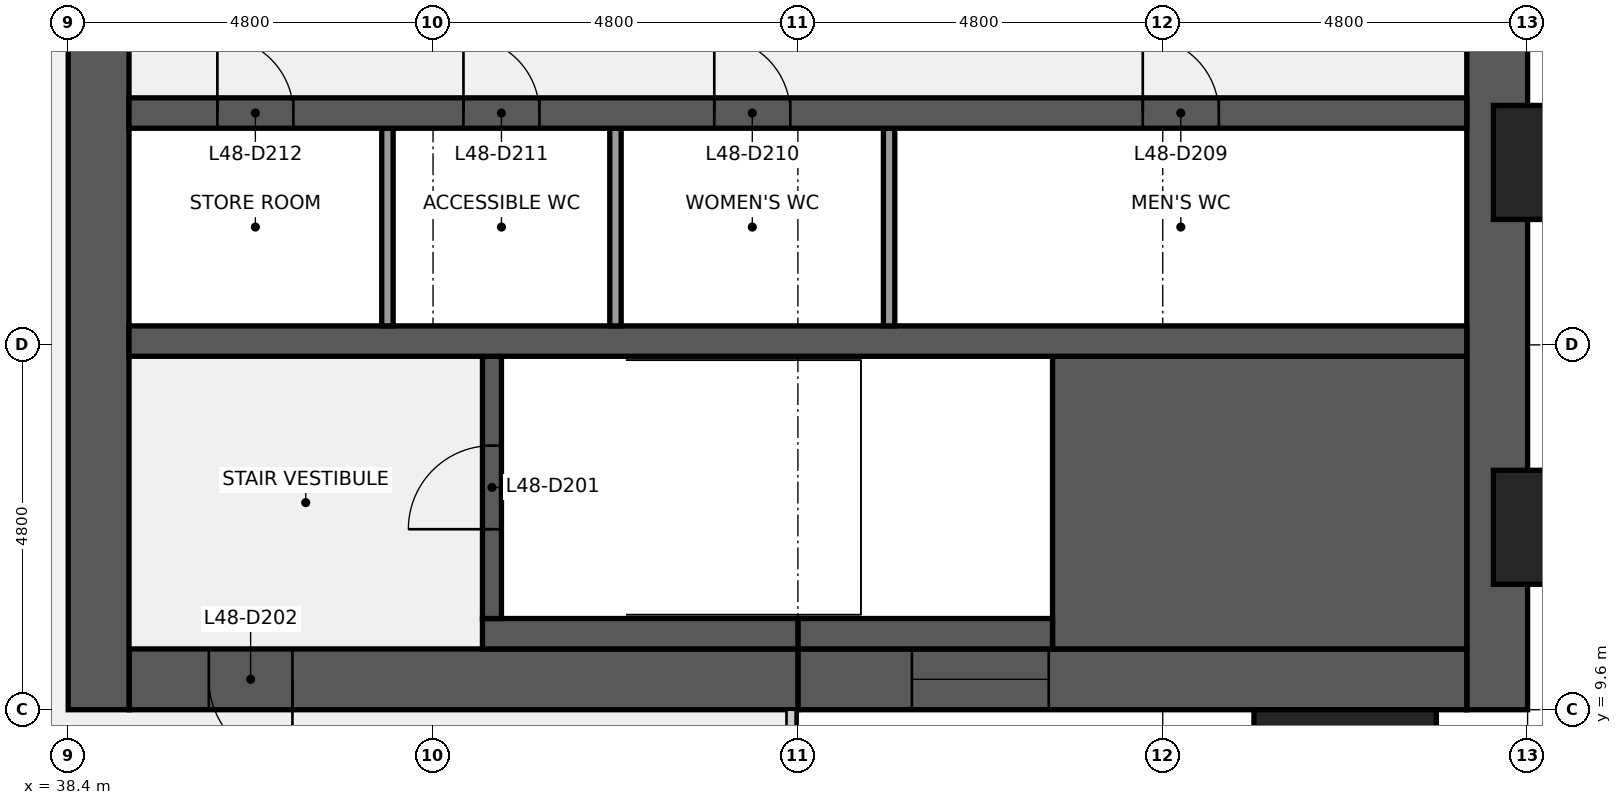
"""IFC4 building model, lengths in metres.
Left out: names, types, materials, properties, quantities, classifications, styles, units other than length and angle.
Written with IfcOpenShell. Run it as: python <this file> out.ifc"""

import sys

from ifc_helpers import new_model, si_unit, direction, frame, frame_2d, origin, origin_2d, place, context, subcontext, project, spatial, rectangle, extrude, element, fill, save


model = new_model("IFC4")
c1 = context("Model", 3, precision=1e-05, world=origin(), true_north=direction((0.0, 1.0)))
c2 = subcontext(c1, "Body", "Model", "MODEL_VIEW")
j1 = project(units=[si_unit("LENGTHUNIT", "METRE"), si_unit("PLANEANGLEUNIT", "RADIAN")], contexts=[c1])
p1 = place(None, origin())
s1 = spatial("IfcSite", under=j1, at=p1, CompositionType="ELEMENT")
p2 = place(p1, origin())
s2 = spatial("IfcBuilding", under=s1, at=p2, CompositionType="ELEMENT")
p3 = place(p2, frame((0.0, 0.0, 221.2)))
s3 = spatial("IfcBuildingStorey", under=s2, at=p3, CompositionType="ELEMENT", Elevation=221.2)
p4 = place(p3, frame((57.2, 38.4, 0.0), z_axis=(0.0, 0.0, 1.0), x_axis=(0.0, -1.0, 0.0)))
e1 = element("IfcWall", 1, at=p4, inside=s3, PredefinedType="SHEAR", context=c2, shape_type="SweptSolid", body=[
    extrude(rectangle(XDim=28.8, YDim=0.8, at=frame_2d((14.4, 0.0))), origin(), (0.0, 0.0, 1.0), 3.84),
])
p5 = place(p4, frame((18.45, 0.0, 0.9)))
e2 = element("IfcOpeningElement", 2, at=p5, cuts=e1, PredefinedType="OPENING", context=c2, shape_type="SweptSolid", body=[
    extrude(rectangle(XDim=1.5, YDim=1.5, at=frame_2d((0.75, 0.75))), frame((0.0, 0.41, 0.0), z_axis=(0.0, -1.0, 0.0), x_axis=(1.0, 0.0, 0.0)), (0.0, 0.0, 1.0), 0.82),
])
p6 = place(p4, frame((8.85, 0.0, 0.9)))
e3 = element("IfcOpeningElement", 3, at=p6, cuts=e1, PredefinedType="OPENING", context=c2, shape_type="SweptSolid", body=[
    extrude(rectangle(XDim=1.5, YDim=1.5, at=frame_2d((0.75, 0.75))), frame((0.0, 0.41, 0.0), z_axis=(0.0, -1.0, 0.0), x_axis=(1.0, 0.0, 0.0)), (0.0, 0.0, 1.0), 0.82),
])
p7 = place(p3, frame((56.8, 10.0, 0.0), z_axis=(0.0, 0.0, 1.0), x_axis=(-1.0, 0.0, 0.0)))
e4 = element("IfcWall", 4, at=p7, inside=s3, PredefinedType="SHEAR", context=c2, shape_type="SweptSolid", body=[
    extrude(rectangle(XDim=8.8, YDim=0.8, at=frame_2d((4.4, 0.0))), origin(), (0.0, 0.0, 1.0), 3.84),
])
p8 = place(p7, frame((5.5, 0.0, 0.9)))
e5 = element("IfcOpeningElement", 5, at=p8, cuts=e4, PredefinedType="OPENING", context=c2, shape_type="SweptSolid", body=[
    extrude(rectangle(XDim=1.8, YDim=1.5, at=frame_2d((0.9, 0.75))), frame((0.0, 0.41, 0.0), z_axis=(0.0, -1.0, 0.0), x_axis=(1.0, 0.0, 0.0)), (0.0, 0.0, 1.0), 0.82),
])
p9 = place(p3, frame((48.0, 10.0, 0.0), z_axis=(0.0, 0.0, 1.0), x_axis=(-1.0, 0.0, 0.0)))
e6 = element("IfcWall", 6, at=p9, inside=s3, PredefinedType="SHEAR", context=c2, shape_type="SweptSolid", body=[
    extrude(rectangle(XDim=8.8, YDim=0.8, at=frame_2d((4.4, 0.0))), origin(), (0.0, 0.0, 1.0), 3.84),
])
p10 = place(p9, frame((6.65, 0.0, 0.0)))
e7 = element("IfcOpeningElement", 7, at=p10, cuts=e6, PredefinedType="OPENING", context=c2, shape_type="SweptSolid", body=[
    extrude(rectangle(XDim=1.1, YDim=2.1, at=frame_2d((0.55, 1.05))), frame((0.0, 0.41, 0.0), z_axis=(0.0, -1.0, 0.0), x_axis=(1.0, 0.0, 0.0)), (0.0, 0.0, 1.0), 0.82),
])
p11 = place(p3, frame((38.8, 9.6, 0.0), z_axis=(0.0, 0.0, 1.0), x_axis=(0.0, 1.0, 0.0)))
e8 = element("IfcWall", 8, at=p11, inside=s3, PredefinedType="SHEAR", context=c2, shape_type="SweptSolid", body=[
    extrude(rectangle(XDim=28.8, YDim=0.8, at=frame_2d((14.4, 0.0))), origin(), (0.0, 0.0, 1.0), 3.84),
])
p12 = place(p11, frame((8.7, 0.0, 0.0)))
e9 = element("IfcOpeningElement", 9, at=p12, cuts=e8, PredefinedType="OPENING", context=c2, shape_type="SweptSolid", body=[
    extrude(rectangle(XDim=1.8, YDim=2.1, at=frame_2d((0.9, 1.05))), frame((0.0, 0.41, 0.0), z_axis=(0.0, -1.0, 0.0), x_axis=(1.0, 0.0, 0.0)), (0.0, 0.0, 1.0), 0.82),
])
p13 = place(p11, frame((18.3, 0.0, 0.0)))
e10 = element("IfcOpeningElement", 10, at=p13, cuts=e8, PredefinedType="OPENING", context=c2, shape_type="SweptSolid", body=[
    extrude(rectangle(XDim=1.8, YDim=2.1, at=frame_2d((0.9, 1.05))), frame((0.0, 0.41, 0.0), z_axis=(0.0, -1.0, 0.0), x_axis=(1.0, 0.0, 0.0)), (0.0, 0.0, 1.0), 0.82),
])
p14 = place(p3, frame((51.35, 12.325, 0.0), z_axis=(0.0, 0.0, 1.0), x_axis=(1.0, 0.0, 0.0)))
e11 = element("IfcWall", 11, at=p14, inside=s3, PredefinedType="SHEAR", context=c2, shape_type="SweptSolid", body=[
    extrude(rectangle(XDim=5.45, YDim=3.85, at=frame_2d((2.725, 0.0))), origin(), (0.0, 0.0, 1.0), 3.84),
])
p15 = place(p3, frame((48.0, 10.6, 0.0), z_axis=(0.0, 0.0, 1.0), x_axis=(1.0, 0.0, 0.0)))
e12 = element("IfcWall", 12, at=p15, inside=s3, PredefinedType="SHEAR", context=c2, shape_type="SweptSolid", body=[
    extrude(rectangle(XDim=3.35, YDim=0.4, at=frame_2d((1.675, 0.0))), origin(), (0.0, 0.0, 1.0), 3.84),
])
p16 = place(p3, frame((43.85, 10.6, 0.0), z_axis=(0.0, 0.0, 1.0), x_axis=(1.0, 0.0, 0.0)))
e13 = element("IfcWall", 13, at=p16, inside=s3, PredefinedType="SHEAR", context=c2, shape_type="SweptSolid", body=[
    extrude(rectangle(XDim=4.15, YDim=0.4, at=frame_2d((2.075, 0.0))), origin(), (0.0, 0.0, 1.0), 3.84),
])
p17 = place(p3, frame((43.975, 10.8, 0.0), z_axis=(0.0, 0.0, 1.0), x_axis=(0.0, 1.0, 0.0)))
e14 = element("IfcWall", 14, at=p17, inside=s3, PredefinedType="SHEAR", context=c2, shape_type="SweptSolid", body=[
    extrude(rectangle(XDim=3.45, YDim=0.25, at=frame_2d((1.725, 0.0))), origin(), (0.0, 0.0, 1.0), 3.84),
])
p18 = place(p17, frame((1.175, 0.0, 0.0)))
e15 = element("IfcOpeningElement", 15, at=p18, cuts=e14, PredefinedType="OPENING", context=c2, shape_type="SweptSolid", body=[
    extrude(rectangle(XDim=1.1, YDim=2.1, at=frame_2d((0.55, 1.05))), frame((0.0, 0.135, 0.0), z_axis=(0.0, -1.0, 0.0), x_axis=(1.0, 0.0, 0.0)), (0.0, 0.0, 1.0), 0.27),
])
p19 = place(p3, frame((39.2, 14.45, 0.0), z_axis=(0.0, 0.0, 1.0), x_axis=(1.0, 0.0, 0.0)))
e16 = element("IfcWall", 16, at=p19, inside=s3, PredefinedType="SHEAR", context=c2, shape_type="SweptSolid", body=[
    extrude(rectangle(XDim=17.6, YDim=0.4, at=frame_2d((8.8, 0.0))), origin(), (0.0, 0.0, 1.0), 3.84),
])
for number, where, z_axis, x_axis in (
    (17, (49.2, 14.65, 0.0), (0.0, 0.0, 1.0), (0.0, 1.0, 0.0)),
    (18, (45.6, 14.65, 0.0), (0.0, 0.0, 1.0), (0.0, 1.0, 0.0)),
    (19, (42.6, 14.65, 0.0), (0.0, 0.0, 1.0), (0.0, 1.0, 0.0)),
):
    element("IfcWall", number, at=place(p3, frame(where, z_axis=z_axis, x_axis=x_axis)), inside=s3, PredefinedType="PARTITIONING", context=c2, shape_type="SweptSolid", body=[
        extrude(rectangle(XDim=2.6, YDim=0.15, at=frame_2d((1.3, 0.0))), origin(), (0.0, 0.0, 1.0), 3.84),
    ])
p20 = place(p3, frame((39.2, 17.45, 0.0), z_axis=(0.0, 0.0, 1.0), x_axis=(1.0, 0.0, 0.0)))
e20 = element("IfcWall", 20, at=p20, inside=s3, PredefinedType="SHEAR", context=c2, shape_type="SweptSolid", body=[
    extrude(rectangle(XDim=17.6, YDim=0.4, at=frame_2d((8.8, 0.0))), origin(), (0.0, 0.0, 1.0), 3.84),
])
p21 = place(p20, frame((13.337, 0.0, 0.0)))
e21 = element("IfcOpeningElement", 21, at=p21, cuts=e20, PredefinedType="OPENING", context=c2, shape_type="SweptSolid", body=[
    extrude(rectangle(XDim=1.0, YDim=2.1, at=frame_2d((0.5, 1.05))), frame((0.0, 0.21, 0.0), z_axis=(0.0, -1.0, 0.0), x_axis=(1.0, 0.0, 0.0)), (0.0, 0.0, 1.0), 0.42),
])
p22 = place(p20, frame((7.7, 0.0, 0.0)))
e22 = element("IfcOpeningElement", 22, at=p22, cuts=e20, PredefinedType="OPENING", context=c2, shape_type="SweptSolid", body=[
    extrude(rectangle(XDim=1.0, YDim=2.1, at=frame_2d((0.5, 1.05))), frame((0.0, 0.21, 0.0), z_axis=(0.0, -1.0, 0.0), x_axis=(1.0, 0.0, 0.0)), (0.0, 0.0, 1.0), 0.42),
])
p23 = place(p20, frame((4.4, 0.0, 0.0)))
e23 = element("IfcOpeningElement", 23, at=p23, cuts=e20, PredefinedType="OPENING", context=c2, shape_type="SweptSolid", body=[
    extrude(rectangle(XDim=1.0, YDim=2.1, at=frame_2d((0.5, 1.05))), frame((0.0, 0.21, 0.0), z_axis=(0.0, -1.0, 0.0), x_axis=(1.0, 0.0, 0.0)), (0.0, 0.0, 1.0), 0.42),
])
p24 = place(p20, frame((1.163, 0.0, 0.0)))
e24 = element("IfcOpeningElement", 24, at=p24, cuts=e20, PredefinedType="OPENING", context=c2, shape_type="SweptSolid", body=[
    extrude(rectangle(XDim=1.0, YDim=2.1, at=frame_2d((0.5, 1.05))), frame((0.0, 0.21, 0.0), z_axis=(0.0, -1.0, 0.0), x_axis=(1.0, 0.0, 0.0)), (0.0, 0.0, 1.0), 0.42),
])
for number, where, z_axis, x_axis in (
    (25, (55.2, 8.85, 0.0), (0.0, 0.0, 1.0), (1.0, 0.0, 0.0)),
    (26, (58.35, 12.0, 0.0), (0.0, 0.0, 1.0), (0.0, 1.0, 0.0)),
    (27, (58.35, 16.8, 0.0), (0.0, 0.0, 1.0), (0.0, 1.0, 0.0)),
):
    element("IfcColumn", number, at=place(p3, frame(where, z_axis=z_axis, x_axis=x_axis)), inside=s3, PredefinedType="PILASTER", context=c2, shape_type="SweptSolid", body=[
        extrude(rectangle(XDim=2.4, YDim=1.5, at=origin_2d()), origin(), (0.0, 0.0, 1.0), 4.0),
    ])
p25 = place(p18, origin())
e28 = element("IfcDoor", 28, at=p25, inside=s3, OperationType="SINGLE_SWING_LEFT", PredefinedType="DOOR", context=c2, shape_type="SweptSolid", body=[
    extrude(rectangle(XDim=1.1, YDim=2.1, at=frame_2d((0.55, 1.05))), frame((0.0, 0.025, 0.0), z_axis=(0.0, -1.0, 0.0), x_axis=(1.0, 0.0, 0.0)), (0.0, 0.0, 1.0), 0.05),
])
fill(e15, e28)
p26 = place(p10, origin())
e29 = element("IfcDoor", 29, at=p26, inside=s3, OperationType="SINGLE_SWING_LEFT", PredefinedType="DOOR", context=c2, shape_type="SweptSolid", body=[
    extrude(rectangle(XDim=1.1, YDim=2.1, at=frame_2d((0.55, 1.05))), frame((0.0, 0.025, 0.0), z_axis=(0.0, -1.0, 0.0), x_axis=(1.0, 0.0, 0.0)), (0.0, 0.0, 1.0), 0.05),
])
fill(e7, e29)
p27 = place(p21, origin())
e30 = element("IfcDoor", 30, at=p27, inside=s3, OperationType="SINGLE_SWING_LEFT", PredefinedType="DOOR", context=c2, shape_type="SweptSolid", body=[
    extrude(rectangle(XDim=1.0, YDim=2.1, at=frame_2d((0.5, 1.05))), frame((0.0, 0.025, 0.0), z_axis=(0.0, -1.0, 0.0), x_axis=(1.0, 0.0, 0.0)), (0.0, 0.0, 1.0), 0.05),
])
fill(e21, e30)
p28 = place(p22, origin())
e31 = element("IfcDoor", 31, at=p28, inside=s3, OperationType="SINGLE_SWING_LEFT", PredefinedType="DOOR", context=c2, shape_type="SweptSolid", body=[
    extrude(rectangle(XDim=1.0, YDim=2.1, at=frame_2d((0.5, 1.05))), frame((0.0, 0.025, 0.0), z_axis=(0.0, -1.0, 0.0), x_axis=(1.0, 0.0, 0.0)), (0.0, 0.0, 1.0), 0.05),
])
fill(e22, e31)
p29 = place(p23, origin())
e32 = element("IfcDoor", 32, at=p29, inside=s3, OperationType="SINGLE_SWING_LEFT", PredefinedType="DOOR", context=c2, shape_type="SweptSolid", body=[
    extrude(rectangle(XDim=1.0, YDim=2.1, at=frame_2d((0.5, 1.05))), frame((0.0, 0.025, 0.0), z_axis=(0.0, -1.0, 0.0), x_axis=(1.0, 0.0, 0.0)), (0.0, 0.0, 1.0), 0.05),
])
fill(e23, e32)
p30 = place(p24, origin())
e33 = element("IfcDoor", 33, at=p30, inside=s3, OperationType="SINGLE_SWING_LEFT", PredefinedType="DOOR", context=c2, shape_type="SweptSolid", body=[
    extrude(rectangle(XDim=1.0, YDim=2.1, at=frame_2d((0.5, 1.05))), frame((0.0, 0.025, 0.0), z_axis=(0.0, -1.0, 0.0), x_axis=(1.0, 0.0, 0.0)), (0.0, 0.0, 1.0), 0.05),
])
fill(e24, e33)
p31 = place(p8, origin())
e34 = element("IfcWindow", 34, at=p31, inside=s3, PartitioningType="SINGLE_PANEL", PredefinedType="WINDOW", context=c2, shape_type="SweptSolid", body=[
    extrude(rectangle(XDim=1.8, YDim=1.5, at=frame_2d((0.9, 0.75))), frame((0.0, 0.03, 0.0), z_axis=(0.0, -1.0, 0.0), x_axis=(1.0, 0.0, 0.0)), (0.0, 0.0, 1.0), 0.06),
])
fill(e5, e34)
save(model, sys.argv[1])
